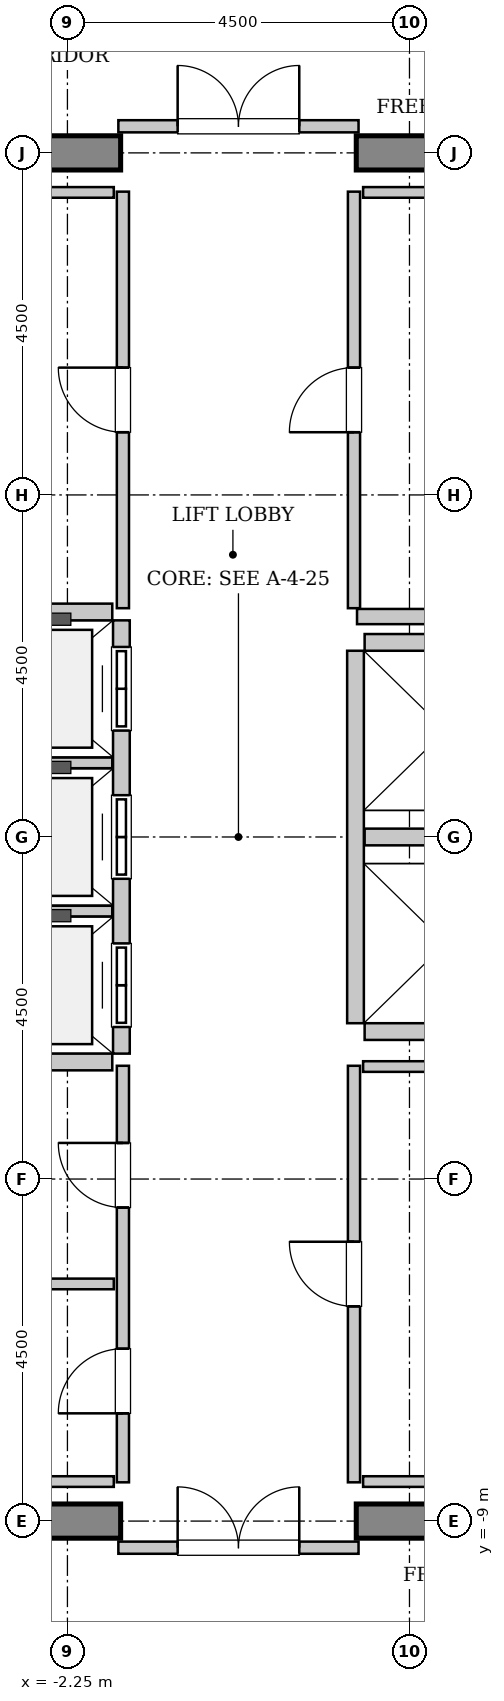
"""IFC4 building model, lengths in metres.
Left out: names, types, materials, properties, quantities, classifications, styles, units other than length and angle.
Written with IfcOpenShell. Run it as: python <this file> out.ifc"""

import sys

from ifc_helpers import new_model, si_unit, direction, frame, frame_2d, origin, place, context, subcontext, project, spatial, rectangle, extrude, source, transform, mapped, element, fill, save


model = new_model("IFC4")
c1 = context("Model", 3, precision=1e-05, world=origin(), true_north=direction((0.0, 1.0)))
c2 = subcontext(c1, "Body", "Model", "MODEL_VIEW")
j1 = project(units=[si_unit("LENGTHUNIT", "METRE"), si_unit("PLANEANGLEUNIT", "RADIAN")], contexts=[c1])
p1 = place(None, origin())
s1 = spatial("IfcSite", under=j1, at=p1, CompositionType="ELEMENT")
p2 = place(p1, origin())
s2 = spatial("IfcBuilding", under=s1, at=p2, CompositionType="ELEMENT")
p3 = place(p2, frame((0.0, 0.0, 302.6)))
s3 = spatial("IfcBuildingStorey", under=s2, at=p3, CompositionType="ELEMENT", Elevation=302.6)
m1 = source(origin(), c2, "Body", "SweptSolid", [
    extrude(rectangle(XDim=9.925, YDim=0.45, at=frame_2d((4.962, 0.0))), origin(), (0.0, 0.0, 1.0), 3.8),
])
for number, where, z_axis, x_axis in (
    (1, (-11.475, 9.0, 0.0), (0.0, 0.0, 1.0), (1.0, 0.0, 0.0)),
    (2, (1.55, 9.0, 0.0), (0.0, 0.0, 1.0), (1.0, 0.0, 0.0)),
    (3, (-11.475, -9.0, 0.0), (0.0, 0.0, 1.0), (1.0, 0.0, 0.0)),
    (4, (1.55, -9.0, 0.0), (0.0, 0.0, 1.0), (1.0, 0.0, 0.0)),
):
    element("IfcWall", number, at=place(p3, frame(where, z_axis=z_axis, x_axis=x_axis)), inside=s3, PredefinedType="SHEAR", context=c2, shape_type="MappedRepresentation", body=[
        mapped(m1, transform((0.0, 0.0, 0.0), x_axis=(1.0, 0.0, 0.0), y_axis=(0.0, 1.0, 0.0), z_axis=(0.0, 0.0, 1.0), scale=1.0)),
    ])
m2 = source(origin(), c2, "Body", "SweptSolid", [
    extrude(rectangle(XDim=5.7, YDim=0.22, at=frame_2d((2.85, 0.0))), origin(), (0.0, 0.0, 1.0), 3.535),
])
p4 = place(p3, frame((-1.54, -2.85, 0.0), z_axis=(0.0, 0.0, 1.0), x_axis=(0.0, 1.0, 0.0)))
e5 = element("IfcWall", 5, at=p4, inside=s3, PredefinedType="SOLIDWALL", context=c2, shape_type="MappedRepresentation", body=[
    mapped(m2, transform((0.0, 0.0, 0.0), x_axis=(1.0, 0.0, 0.0), y_axis=(0.0, 1.0, 0.0), z_axis=(0.0, 0.0, 1.0), scale=1.0)),
])
p5 = place(p4, frame((0.35, 0.0, 0.0)))
e6 = element("IfcOpeningElement", 6, at=p5, cuts=e5, PredefinedType="OPENING", context=c2, shape_type="SweptSolid", body=[
    extrude(rectangle(XDim=1.1, YDim=2.2, at=frame_2d((0.55, 1.1))), frame((0.0, 0.12, 0.0), z_axis=(0.0, -1.0, 0.0), x_axis=(1.0, 0.0, 0.0)), (0.0, 0.0, 1.0), 0.24),
])
p6 = place(p4, frame((2.3, 0.0, 0.0)))
e7 = element("IfcOpeningElement", 7, at=p6, cuts=e5, PredefinedType="OPENING", context=c2, shape_type="SweptSolid", body=[
    extrude(rectangle(XDim=1.1, YDim=2.2, at=frame_2d((0.55, 1.1))), frame((0.0, 0.12, 0.0), z_axis=(0.0, -1.0, 0.0), x_axis=(1.0, 0.0, 0.0)), (0.0, 0.0, 1.0), 0.24),
])
p7 = place(p4, frame((4.25, 0.0, 0.0)))
e8 = element("IfcOpeningElement", 8, at=p7, cuts=e5, PredefinedType="OPENING", context=c2, shape_type="SweptSolid", body=[
    extrude(rectangle(XDim=1.1, YDim=2.2, at=frame_2d((0.55, 1.1))), frame((0.0, 0.12, 0.0), z_axis=(0.0, -1.0, 0.0), x_axis=(1.0, 0.0, 0.0)), (0.0, 0.0, 1.0), 0.24),
])
m3 = source(origin(), c2, "Body", "SweptSolid", [
    extrude(rectangle(XDim=2.13, YDim=0.22, at=frame_2d((1.065, 0.0))), origin(), (0.0, 0.0, 1.0), 3.535),
])
p8 = place(p3, frame((-3.79, -2.96, 0.0), z_axis=(0.0, 0.0, 1.0), x_axis=(1.0, 0.0, 0.0)))
e9 = element("IfcWall", 9, at=p8, inside=s3, PredefinedType="SOLIDWALL", context=c2, shape_type="MappedRepresentation", body=[
    mapped(m3, transform((0.0, 0.0, 0.0), x_axis=(1.0, 0.0, 0.0), y_axis=(0.0, 1.0, 0.0), z_axis=(0.0, 0.0, 1.0), scale=1.0)),
])
m4 = source(origin(), c2, "Body", "SweptSolid", [
    extrude(rectangle(XDim=2.13, YDim=0.14, at=frame_2d((1.065, 0.0))), origin(), (0.0, 0.0, 1.0), 3.535),
])
for number, where, z_axis, x_axis in (
    (10, (-3.79, -0.975, 0.0), (0.0, 0.0, 1.0), (1.0, 0.0, 0.0)),
    (11, (-3.79, 0.975, 0.0), (0.0, 0.0, 1.0), (1.0, 0.0, 0.0)),
):
    element("IfcWall", number, at=place(p3, frame(where, z_axis=z_axis, x_axis=x_axis)), inside=s3, PredefinedType="PARTITIONING", context=c2, shape_type="MappedRepresentation", body=[
        mapped(m4, transform((0.0, 0.0, 0.0), x_axis=(1.0, 0.0, 0.0), y_axis=(0.0, 1.0, 0.0), z_axis=(0.0, 0.0, 1.0), scale=1.0)),
    ])
p9 = place(p3, frame((-1.66, 2.96, 0.0), z_axis=(0.0, 0.0, 1.0), x_axis=(-1.0, 0.0, 0.0)))
e12 = element("IfcWall", 12, at=p9, inside=s3, PredefinedType="SOLIDWALL", context=c2, shape_type="MappedRepresentation", body=[
    mapped(m3, transform((0.0, 0.0, 0.0), x_axis=(1.0, 0.0, 0.0), y_axis=(0.0, 1.0, 0.0), z_axis=(0.0, 0.0, 1.0), scale=1.0)),
])
m5 = source(origin(), c2, "Body", "SweptSolid", [
    extrude(rectangle(XDim=4.9, YDim=0.22, at=frame_2d((2.45, 0.0))), origin(), (0.0, 0.0, 1.0), 3.535),
])
p10 = place(p3, frame((1.54, 2.45, 0.0), z_axis=(0.0, 0.0, 1.0), x_axis=(0.0, -1.0, 0.0)))
e13 = element("IfcWall", 13, at=p10, inside=s3, PredefinedType="SOLIDWALL", context=c2, shape_type="MappedRepresentation", body=[
    mapped(m5, transform((0.0, 0.0, 0.0), x_axis=(1.0, 0.0, 0.0), y_axis=(0.0, 1.0, 0.0), z_axis=(0.0, 0.0, 1.0), scale=1.0)),
])
for number, where, z_axis, x_axis in (
    (14, (1.66, -2.56, 0.0), (0.0, 0.0, 1.0), (1.0, 0.0, 0.0)),
    (15, (1.66, 0.0, 0.0), (0.0, 0.0, 1.0), (1.0, 0.0, 0.0)),
    (16, (3.79, 2.56, 0.0), (0.0, 0.0, 1.0), (-1.0, 0.0, 0.0)),
):
    element("IfcWall", number, at=place(p3, frame(where, z_axis=z_axis, x_axis=x_axis)), inside=s3, PredefinedType="SOLIDWALL", context=c2, shape_type="MappedRepresentation", body=[
        mapped(m3, transform((0.0, 0.0, 0.0), x_axis=(1.0, 0.0, 0.0), y_axis=(0.0, 1.0, 0.0), z_axis=(0.0, 0.0, 1.0), scale=1.0)),
    ])
m6 = source(origin(), c2, "Body", "SweptSolid", [
    extrude(rectangle(XDim=2.52, YDim=0.2, at=frame_2d((1.26, 0.0))), origin(), (0.0, 0.0, 1.0), 3.535),
])
p11 = place(p3, frame((1.56, 2.9, 0.0), z_axis=(0.0, 0.0, 1.0), x_axis=(1.0, 0.0, 0.0)))
e17 = element("IfcWall", 17, at=p11, inside=s3, PredefinedType="PARTITIONING", context=c2, shape_type="MappedRepresentation", body=[
    mapped(m6, transform((0.0, 0.0, 0.0), x_axis=(1.0, 0.0, 0.0), y_axis=(0.0, 1.0, 0.0), z_axis=(0.0, 0.0, 1.0), scale=1.0)),
])
m7 = source(origin(), c2, "Body", "SweptSolid", [
    extrude(rectangle(XDim=3.16, YDim=0.16, at=frame_2d((1.58, 0.0))), origin(), (0.0, 0.0, 1.0), 2.625),
])
p12 = place(p3, frame((-1.58, 9.35, 0.0), z_axis=(0.0, 0.0, 1.0), x_axis=(1.0, 0.0, 0.0)))
e18 = element("IfcWall", 18, at=p12, inside=s3, PredefinedType="PARTITIONING", context=c2, shape_type="MappedRepresentation", body=[
    mapped(m7, transform((0.0, 0.0, 0.0), x_axis=(1.0, 0.0, 0.0), y_axis=(0.0, 1.0, 0.0), z_axis=(0.0, 0.0, 1.0), scale=1.0)),
])
p13 = place(p12, frame((0.78, 0.0, 0.0)))
e19 = element("IfcOpeningElement", 19, at=p13, cuts=e18, PredefinedType="OPENING", context=c2, shape_type="SweptSolid", body=[
    extrude(rectangle(XDim=1.6, YDim=2.3, at=frame_2d((0.8, 1.15))), frame((0.0, 0.09, 0.0), z_axis=(0.0, -1.0, 0.0), x_axis=(1.0, 0.0, 0.0)), (0.0, 0.0, 1.0), 0.18),
])
p14 = place(p3, frame((-1.58, -9.35, 0.0), z_axis=(0.0, 0.0, 1.0), x_axis=(1.0, 0.0, 0.0)))
e20 = element("IfcWall", 20, at=p14, inside=s3, PredefinedType="PARTITIONING", context=c2, shape_type="MappedRepresentation", body=[
    mapped(m7, transform((0.0, 0.0, 0.0), x_axis=(1.0, 0.0, 0.0), y_axis=(0.0, 1.0, 0.0), z_axis=(0.0, 0.0, 1.0), scale=1.0)),
])
p15 = place(p14, frame((0.78, 0.0, 0.0)))
e21 = element("IfcOpeningElement", 21, at=p15, cuts=e20, PredefinedType="OPENING", context=c2, shape_type="SweptSolid", body=[
    extrude(rectangle(XDim=1.6, YDim=2.3, at=frame_2d((0.8, 1.15))), frame((0.0, 0.09, 0.0), z_axis=(0.0, -1.0, 0.0), x_axis=(1.0, 0.0, 0.0)), (0.0, 0.0, 1.0), 0.18),
])
m8 = source(origin(), c2, "Body", "SweptSolid", [
    extrude(rectangle(XDim=5.48, YDim=0.16, at=frame_2d((2.74, 0.0))), origin(), (0.0, 0.0, 1.0), 3.535),
])
p16 = place(p3, frame((-1.52, 3.01, 0.0), z_axis=(0.0, 0.0, 1.0), x_axis=(0.0, 1.0, 0.0)))
e22 = element("IfcWall", 22, at=p16, inside=s3, PredefinedType="PARTITIONING", context=c2, shape_type="MappedRepresentation", body=[
    mapped(m8, transform((0.0, 0.0, 0.0), x_axis=(1.0, 0.0, 0.0), y_axis=(0.0, 1.0, 0.0), z_axis=(0.0, 0.0, 1.0), scale=1.0)),
])
p17 = place(p16, frame((2.315, 0.0, 0.0)))
e23 = element("IfcOpeningElement", 23, at=p17, cuts=e22, PredefinedType="OPENING", context=c2, shape_type="SweptSolid", body=[
    extrude(rectangle(XDim=0.85, YDim=2.1, at=frame_2d((0.425, 1.05))), frame((0.0, 0.09, 0.0), z_axis=(0.0, -1.0, 0.0), x_axis=(1.0, 0.0, 0.0)), (0.0, 0.0, 1.0), 0.18),
])
m9 = source(origin(), c2, "Body", "SweptSolid", [
    extrude(rectangle(XDim=3.15, YDim=0.14, at=frame_2d((1.575, 0.0))), origin(), (0.0, 0.0, 1.0), 3.535),
])
p18 = place(p3, frame((-4.79, 8.48, 0.0), z_axis=(0.0, 0.0, 1.0), x_axis=(1.0, 0.0, 0.0)))
e24 = element("IfcWall", 24, at=p18, inside=s3, PredefinedType="PARTITIONING", context=c2, shape_type="MappedRepresentation", body=[
    mapped(m9, transform((0.0, 0.0, 0.0), x_axis=(1.0, 0.0, 0.0), y_axis=(0.0, 1.0, 0.0), z_axis=(0.0, 0.0, 1.0), scale=1.0)),
])
p19 = place(p3, frame((-1.52, -8.49, 0.0), z_axis=(0.0, 0.0, 1.0), x_axis=(0.0, 1.0, 0.0)))
e25 = element("IfcWall", 25, at=p19, inside=s3, PredefinedType="PARTITIONING", context=c2, shape_type="MappedRepresentation", body=[
    mapped(m8, transform((0.0, 0.0, 0.0), x_axis=(1.0, 0.0, 0.0), y_axis=(0.0, 1.0, 0.0), z_axis=(0.0, 0.0, 1.0), scale=1.0)),
])
p20 = place(p19, frame((0.907, 0.0, 0.0)))
e26 = element("IfcOpeningElement", 26, at=p20, cuts=e25, PredefinedType="OPENING", context=c2, shape_type="SweptSolid", body=[
    extrude(rectangle(XDim=0.85, YDim=2.1, at=frame_2d((0.425, 1.05))), frame((0.0, 0.09, 0.0), z_axis=(0.0, -1.0, 0.0), x_axis=(1.0, 0.0, 0.0)), (0.0, 0.0, 1.0), 0.18),
])
p21 = place(p19, frame((3.615, 0.0, 0.0)))
e27 = element("IfcOpeningElement", 27, at=p21, cuts=e25, PredefinedType="OPENING", context=c2, shape_type="SweptSolid", body=[
    extrude(rectangle(XDim=0.85, YDim=2.1, at=frame_2d((0.425, 1.05))), frame((0.0, 0.09, 0.0), z_axis=(0.0, -1.0, 0.0), x_axis=(1.0, 0.0, 0.0)), (0.0, 0.0, 1.0), 0.18),
])
m10 = source(origin(), c2, "Body", "SweptSolid", [
    extrude(rectangle(XDim=5.55, YDim=0.14, at=frame_2d((2.775, 0.0))), origin(), (0.0, 0.0, 1.0), 3.535),
])
p22 = place(p3, frame((-7.19, -5.88, 0.0), z_axis=(0.0, 0.0, 1.0), x_axis=(1.0, 0.0, 0.0)))
e28 = element("IfcWall", 28, at=p22, inside=s3, PredefinedType="PARTITIONING", context=c2, shape_type="MappedRepresentation", body=[
    mapped(m10, transform((0.0, 0.0, 0.0), x_axis=(1.0, 0.0, 0.0), y_axis=(0.0, 1.0, 0.0), z_axis=(0.0, 0.0, 1.0), scale=1.0)),
])
p23 = place(p3, frame((1.52, 3.01, 0.0), z_axis=(0.0, 0.0, 1.0), x_axis=(0.0, 1.0, 0.0)))
e29 = element("IfcWall", 29, at=p23, inside=s3, PredefinedType="PARTITIONING", context=c2, shape_type="MappedRepresentation", body=[
    mapped(m8, transform((0.0, 0.0, 0.0), x_axis=(1.0, 0.0, 0.0), y_axis=(0.0, 1.0, 0.0), z_axis=(0.0, 0.0, 1.0), scale=1.0)),
])
p24 = place(p23, frame((2.315, 0.0, 0.0)))
e30 = element("IfcOpeningElement", 30, at=p24, cuts=e29, PredefinedType="OPENING", context=c2, shape_type="SweptSolid", body=[
    extrude(rectangle(XDim=0.85, YDim=2.1, at=frame_2d((0.425, 1.05))), frame((0.0, 0.09, 0.0), z_axis=(0.0, -1.0, 0.0), x_axis=(1.0, 0.0, 0.0)), (0.0, 0.0, 1.0), 0.18),
])
for number, where, z_axis, x_axis in (
    (31, (1.64, 8.48, 0.0), (0.0, 0.0, 1.0), (1.0, 0.0, 0.0)),
    (32, (-4.79, -8.48, 0.0), (0.0, 0.0, 1.0), (1.0, 0.0, 0.0)),
):
    element("IfcWall", number, at=place(p3, frame(where, z_axis=z_axis, x_axis=x_axis)), inside=s3, PredefinedType="PARTITIONING", context=c2, shape_type="MappedRepresentation", body=[
        mapped(m9, transform((0.0, 0.0, 0.0), x_axis=(1.0, 0.0, 0.0), y_axis=(0.0, 1.0, 0.0), z_axis=(0.0, 0.0, 1.0), scale=1.0)),
    ])
p25 = place(p3, frame((1.52, -8.49, 0.0), z_axis=(0.0, 0.0, 1.0), x_axis=(0.0, 1.0, 0.0)))
e33 = element("IfcWall", 33, at=p25, inside=s3, PredefinedType="PARTITIONING", context=c2, shape_type="MappedRepresentation", body=[
    mapped(m8, transform((0.0, 0.0, 0.0), x_axis=(1.0, 0.0, 0.0), y_axis=(0.0, 1.0, 0.0), z_axis=(0.0, 0.0, 1.0), scale=1.0)),
])
p26 = place(p25, frame((2.315, 0.0, 0.0)))
e34 = element("IfcOpeningElement", 34, at=p26, cuts=e33, PredefinedType="OPENING", context=c2, shape_type="SweptSolid", body=[
    extrude(rectangle(XDim=0.85, YDim=2.1, at=frame_2d((0.425, 1.05))), frame((0.0, 0.09, 0.0), z_axis=(0.0, -1.0, 0.0), x_axis=(1.0, 0.0, 0.0)), (0.0, 0.0, 1.0), 0.18),
])
for number, where, z_axis, x_axis in (
    (35, (1.64, -3.02, 0.0), (0.0, 0.0, 1.0), (1.0, 0.0, 0.0)),
    (36, (1.64, -8.48, 0.0), (0.0, 0.0, 1.0), (1.0, 0.0, 0.0)),
):
    element("IfcWall", number, at=place(p3, frame(where, z_axis=z_axis, x_axis=x_axis)), inside=s3, PredefinedType="PARTITIONING", context=c2, shape_type="MappedRepresentation", body=[
        mapped(m9, transform((0.0, 0.0, 0.0), x_axis=(1.0, 0.0, 0.0), y_axis=(0.0, 1.0, 0.0), z_axis=(0.0, 0.0, 1.0), scale=1.0)),
    ])
m11 = source(origin(), c2, "Body", "SweptSolid", [
    extrude(rectangle(XDim=1.1, YDim=2.2, at=frame_2d((0.55, 1.1))), frame((0.0, 0.025, 0.0), z_axis=(0.0, -1.0, 0.0), x_axis=(1.0, 0.0, 0.0)), (0.0, 0.0, 1.0), 0.05),
])
p27 = place(p5, origin())
e37 = element("IfcDoor", 37, at=p27, inside=s3, OperationType="DOUBLE_DOOR_SLIDING", PredefinedType="DOOR", context=c2, shape_type="MappedRepresentation", body=[
    mapped(m11, transform((0.0, 0.0, 0.0), x_axis=(1.0, 0.0, 0.0), y_axis=(0.0, 1.0, 0.0), z_axis=(0.0, 0.0, 1.0), scale=1.0)),
])
fill(e6, e37)
p28 = place(p6, origin())
e38 = element("IfcDoor", 38, at=p28, inside=s3, OperationType="DOUBLE_DOOR_SLIDING", PredefinedType="DOOR", context=c2, shape_type="MappedRepresentation", body=[
    mapped(m11, transform((0.0, 0.0, 0.0), x_axis=(1.0, 0.0, 0.0), y_axis=(0.0, 1.0, 0.0), z_axis=(0.0, 0.0, 1.0), scale=1.0)),
])
fill(e7, e38)
p29 = place(p7, origin())
e39 = element("IfcDoor", 39, at=p29, inside=s3, OperationType="DOUBLE_DOOR_SLIDING", PredefinedType="DOOR", context=c2, shape_type="MappedRepresentation", body=[
    mapped(m11, transform((0.0, 0.0, 0.0), x_axis=(1.0, 0.0, 0.0), y_axis=(0.0, 1.0, 0.0), z_axis=(0.0, 0.0, 1.0), scale=1.0)),
])
fill(e8, e39)
m12 = source(origin(), c2, "Body", "SweptSolid", [
    extrude(rectangle(XDim=1.6, YDim=2.3, at=frame_2d((0.8, 1.15))), frame((0.0, 0.025, 0.0), z_axis=(0.0, -1.0, 0.0), x_axis=(1.0, 0.0, 0.0)), (0.0, 0.0, 1.0), 0.05),
])
p30 = place(p13, origin())
e40 = element("IfcDoor", 40, at=p30, inside=s3, OperationType="DOUBLE_DOOR_SINGLE_SWING", PredefinedType="DOOR", context=c2, shape_type="MappedRepresentation", body=[
    mapped(m12, transform((0.0, 0.0, 0.0), x_axis=(1.0, 0.0, 0.0), y_axis=(0.0, 1.0, 0.0), z_axis=(0.0, 0.0, 1.0), scale=1.0)),
])
fill(e19, e40)
p31 = place(p15, origin())
e41 = element("IfcDoor", 41, at=p31, inside=s3, OperationType="DOUBLE_DOOR_SINGLE_SWING", PredefinedType="DOOR", context=c2, shape_type="MappedRepresentation", body=[
    mapped(m12, transform((0.0, 0.0, 0.0), x_axis=(1.0, 0.0, 0.0), y_axis=(0.0, 1.0, 0.0), z_axis=(0.0, 0.0, 1.0), scale=1.0)),
])
fill(e21, e41)
m13 = source(origin(), c2, "Body", "SweptSolid", [
    extrude(rectangle(XDim=0.85, YDim=2.1, at=frame_2d((0.425, 1.05))), frame((0.0, 0.025, 0.0), z_axis=(0.0, -1.0, 0.0), x_axis=(1.0, 0.0, 0.0)), (0.0, 0.0, 1.0), 0.05),
])
p32 = place(p17, origin())
e42 = element("IfcDoor", 42, at=p32, inside=s3, OperationType="SINGLE_SWING_RIGHT", PredefinedType="DOOR", context=c2, shape_type="MappedRepresentation", body=[
    mapped(m13, transform((0.0, 0.0, 0.0), x_axis=(1.0, 0.0, 0.0), y_axis=(0.0, 1.0, 0.0), z_axis=(0.0, 0.0, 1.0), scale=1.0)),
])
fill(e23, e42)
p33 = place(p20, origin())
e43 = element("IfcDoor", 43, at=p33, inside=s3, OperationType="SINGLE_SWING_LEFT", PredefinedType="DOOR", context=c2, shape_type="MappedRepresentation", body=[
    mapped(m13, transform((0.0, 0.0, 0.0), x_axis=(1.0, 0.0, 0.0), y_axis=(0.0, 1.0, 0.0), z_axis=(0.0, 0.0, 1.0), scale=1.0)),
])
fill(e26, e43)
p34 = place(p21, origin())
e44 = element("IfcDoor", 44, at=p34, inside=s3, OperationType="SINGLE_SWING_RIGHT", PredefinedType="DOOR", context=c2, shape_type="MappedRepresentation", body=[
    mapped(m13, transform((0.0, 0.0, 0.0), x_axis=(1.0, 0.0, 0.0), y_axis=(0.0, 1.0, 0.0), z_axis=(0.0, 0.0, 1.0), scale=1.0)),
])
fill(e27, e44)
p35 = place(p24, origin())
e45 = element("IfcDoor", 45, at=p35, inside=s3, OperationType="SINGLE_SWING_LEFT", PredefinedType="DOOR", context=c2, shape_type="MappedRepresentation", body=[
    mapped(m13, transform((0.0, 0.0, 0.0), x_axis=(1.0, 0.0, 0.0), y_axis=(0.0, 1.0, 0.0), z_axis=(0.0, 0.0, 1.0), scale=1.0)),
])
fill(e30, e45)
p36 = place(p26, origin())
e46 = element("IfcDoor", 46, at=p36, inside=s3, OperationType="SINGLE_SWING_RIGHT", PredefinedType="DOOR", context=c2, shape_type="MappedRepresentation", body=[
    mapped(m13, transform((0.0, 0.0, 0.0), x_axis=(1.0, 0.0, 0.0), y_axis=(0.0, 1.0, 0.0), z_axis=(0.0, 0.0, 1.0), scale=1.0)),
])
fill(e34, e46)
save(model, sys.argv[1])
